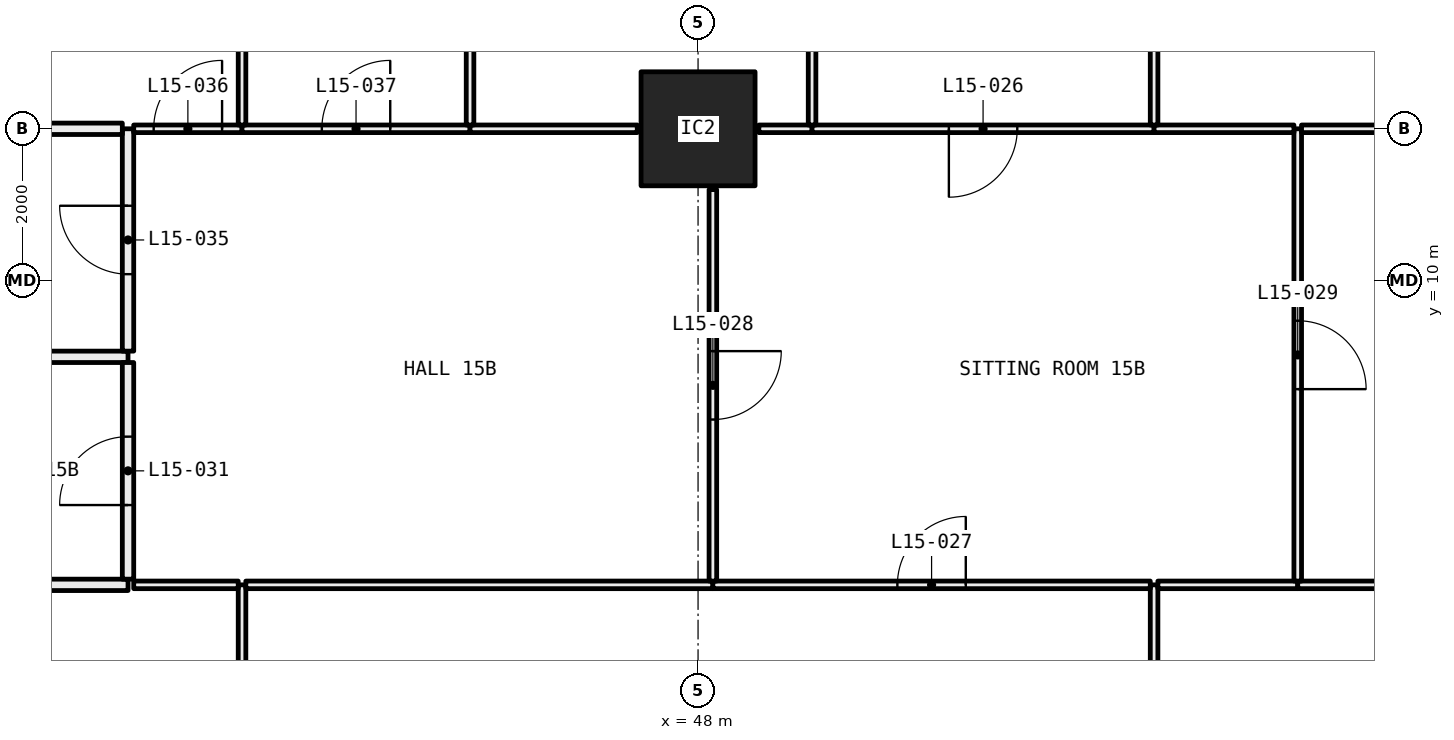
"""IFC4 building model, lengths in metres.
Left out: names, types, materials, properties, quantities, classifications, styles, units other than length and angle.
Written with IfcOpenShell. Run it as: python <this file> out.ifc"""

import sys

from ifc_helpers import new_model, si_unit, direction, frame, frame_2d, origin, origin_2d, place, context, subcontext, project, spatial, rectangle, hollow_rectangle, extrude, element, fill, save


model = new_model("IFC4")
c1 = context("Model", 3, precision=1e-05, world=origin(), true_north=direction((0.0, 1.0)))
c2 = subcontext(c1, "Body", "Model", "MODEL_VIEW")
j1 = project(units=[si_unit("LENGTHUNIT", "METRE"), si_unit("PLANEANGLEUNIT", "RADIAN")], contexts=[c1])
p1 = place(None, origin())
s1 = spatial("IfcSite", under=j1, at=p1, CompositionType="ELEMENT")
p2 = place(p1, origin())
s2 = spatial("IfcBuilding", under=s1, at=p2, CompositionType="ELEMENT")
p3 = place(p2, frame((0.0, 0.0, 64.5)))
s3 = spatial("IfcBuildingStorey", under=s2, at=p3, CompositionType="ELEMENT", Elevation=64.5)
p4 = place(p3, frame((48.0, 12.0, 0.0), z_axis=(0.0, 0.0, 1.0), x_axis=(1.0, 0.0, 0.0)))
e1 = element("IfcColumn", 1, at=p4, inside=s3, PredefinedType="COLUMN", context=c2, shape_type="SweptSolid", body=[
    extrude(hollow_rectangle(XDim=1.5, YDim=1.5, WallThickness=0.065, at=origin_2d()), origin(), (0.0, 0.0, 1.0), 3.05),
])
p5 = place(p3, frame((42.0, 0.72, 0.0), z_axis=(0.0, 0.0, 1.0), x_axis=(0.0, 1.0, 0.0)))
e2 = element("IfcWall", 2, at=p5, inside=s3, PredefinedType="PARTITIONING", context=c2, shape_type="SweptSolid", body=[
    extrude(rectangle(XDim=5.28, YDim=0.1, at=frame_2d((2.64, 0.0))), origin(), (0.0, 0.0, 1.0), 3.05),
])
p6 = place(p5, frame((2.19, 0.0, 0.0)))
e3 = element("IfcOpeningElement", 3, at=p6, cuts=e2, PredefinedType="OPENING", context=c2, shape_type="SweptSolid", body=[
    extrude(rectangle(XDim=0.9, YDim=2.1, at=frame_2d((0.45, 1.05))), frame((0.0, 0.06, 0.0), z_axis=(0.0, -1.0, 0.0), x_axis=(1.0, 0.0, 0.0)), (0.0, 0.0, 1.0), 0.12),
])
p7 = place(p3, frame((40.5, 6.0, 0.0), z_axis=(0.0, 0.0, 1.0), x_axis=(-1.0, 0.0, 0.0)))
e4 = element("IfcWall", 4, at=p7, inside=s3, PredefinedType="PARTITIONING", context=c2, shape_type="SweptSolid", body=[
    extrude(rectangle(XDim=4.4, YDim=0.15, at=frame_2d((2.2, 0.0))), origin(), (0.0, 0.0, 1.0), 3.05),
])
p8 = place(p3, frame((41.95, 6.0, 0.0), z_axis=(0.0, 0.0, 1.0), x_axis=(-1.0, 0.0, 0.0)))
e5 = element("IfcWall", 5, at=p8, inside=s3, PredefinedType="PARTITIONING", context=c2, shape_type="SweptSolid", body=[
    extrude(rectangle(XDim=1.375, YDim=0.1, at=frame_2d((0.688, 0.0))), origin(), (0.0, 0.0, 1.0), 3.05),
])
p9 = place(p3, frame((54.0, 0.72, 0.0), z_axis=(0.0, 0.0, 1.0), x_axis=(0.0, 1.0, 0.0)))
e6 = element("IfcWall", 6, at=p9, inside=s3, PredefinedType="PARTITIONING", context=c2, shape_type="SweptSolid", body=[
    extrude(rectangle(XDim=5.28, YDim=0.1, at=frame_2d((2.64, 0.0))), origin(), (0.0, 0.0, 1.0), 3.05),
])
p10 = place(p9, frame((2.19, 0.0, 0.0)))
e7 = element("IfcOpeningElement", 7, at=p10, cuts=e6, PredefinedType="OPENING", context=c2, shape_type="SweptSolid", body=[
    extrude(rectangle(XDim=0.9, YDim=2.1, at=frame_2d((0.45, 1.05))), frame((0.0, 0.06, 0.0), z_axis=(0.0, -1.0, 0.0), x_axis=(1.0, 0.0, 0.0)), (0.0, 0.0, 1.0), 0.12),
])
p11 = place(p3, frame((48.195, 6.0, 0.0), z_axis=(0.0, 0.0, 1.0), x_axis=(-1.0, 0.0, 0.0)))
e8 = element("IfcWall", 8, at=p11, inside=s3, PredefinedType="PARTITIONING", context=c2, shape_type="SweptSolid", body=[
    extrude(rectangle(XDim=6.145, YDim=0.1, at=frame_2d((3.073, 0.0))), origin(), (0.0, 0.0, 1.0), 2.45),
])
p12 = place(p3, frame((53.95, 6.0, 0.0), z_axis=(0.0, 0.0, 1.0), x_axis=(-1.0, 0.0, 0.0)))
e9 = element("IfcWall", 9, at=p12, inside=s3, PredefinedType="PARTITIONING", context=c2, shape_type="SweptSolid", body=[
    extrude(rectangle(XDim=5.755, YDim=0.1, at=frame_2d((2.877, 0.0))), origin(), (0.0, 0.0, 1.0), 3.05),
])
p13 = place(p12, frame((2.427, 0.0, 0.0)))
e10 = element("IfcOpeningElement", 10, at=p13, cuts=e9, PredefinedType="OPENING", context=c2, shape_type="SweptSolid", body=[
    extrude(rectangle(XDim=0.9, YDim=2.1, at=frame_2d((0.45, 1.05))), frame((0.0, 0.06, 0.0), z_axis=(0.0, -1.0, 0.0), x_axis=(1.0, 0.0, 0.0)), (0.0, 0.0, 1.0), 0.12),
])
p14 = place(p3, frame((55.89, 6.0, 0.0), z_axis=(0.0, 0.0, 1.0), x_axis=(-1.0, 0.0, 0.0)))
e11 = element("IfcWall", 11, at=p14, inside=s3, PredefinedType="PARTITIONING", context=c2, shape_type="SweptSolid", body=[
    extrude(rectangle(XDim=1.84, YDim=0.1, at=frame_2d((0.92, 0.0))), origin(), (0.0, 0.0, 1.0), 3.05),
])
p15 = place(p3, frame((59.95, 6.0, 0.0), z_axis=(0.0, 0.0, 1.0), x_axis=(-1.0, 0.0, 0.0)))
e12 = element("IfcWall", 12, at=p15, inside=s3, PredefinedType="PARTITIONING", context=c2, shape_type="SweptSolid", body=[
    extrude(rectangle(XDim=4.06, YDim=0.1, at=frame_2d((2.03, 0.0))), origin(), (0.0, 0.0, 1.0), 2.45),
])
p16 = place(p3, frame((40.5, 9.0, 0.0), z_axis=(0.0, 0.0, 1.0), x_axis=(-1.0, 0.0, 0.0)))
e13 = element("IfcWall", 13, at=p16, inside=s3, PredefinedType="PARTITIONING", context=c2, shape_type="SweptSolid", body=[
    extrude(rectangle(XDim=4.4, YDim=0.15, at=frame_2d((2.2, 0.0))), origin(), (0.0, 0.0, 1.0), 3.05),
])
p17 = place(p3, frame((40.5, 6.075, 0.0), z_axis=(0.0, 0.0, 1.0), x_axis=(0.0, 1.0, 0.0)))
e14 = element("IfcWall", 14, at=p17, inside=s3, PredefinedType="PARTITIONING", context=c2, shape_type="SweptSolid", body=[
    extrude(rectangle(XDim=2.85, YDim=0.15, at=frame_2d((1.425, 0.0))), origin(), (0.0, 0.0, 1.0), 3.05),
])
p18 = place(p17, frame((0.975, 0.0, 0.0)))
e15 = element("IfcOpeningElement", 15, at=p18, cuts=e14, PredefinedType="OPENING", context=c2, shape_type="SweptSolid", body=[
    extrude(rectangle(XDim=0.9, YDim=2.1, at=frame_2d((0.45, 1.05))), frame((0.0, 0.085, 0.0), z_axis=(0.0, -1.0, 0.0), x_axis=(1.0, 0.0, 0.0)), (0.0, 0.0, 1.0), 0.17),
])
p19 = place(p3, frame((40.5, 9.075, 0.0), z_axis=(0.0, 0.0, 1.0), x_axis=(0.0, 1.0, 0.0)))
e16 = element("IfcWall", 16, at=p19, inside=s3, PredefinedType="PARTITIONING", context=c2, shape_type="SweptSolid", body=[
    extrude(rectangle(XDim=2.925, YDim=0.15, at=frame_2d((1.462, 0.0))), origin(), (0.0, 0.0, 1.0), 2.45),
])
p20 = place(p19, frame((1.012, 0.0, 0.0)))
e17 = element("IfcOpeningElement", 17, at=p20, cuts=e16, PredefinedType="OPENING", context=c2, shape_type="SweptSolid", body=[
    extrude(rectangle(XDim=0.9, YDim=2.1, at=frame_2d((0.45, 1.05))), frame((0.0, 0.085, 0.0), z_axis=(0.0, -1.0, 0.0), x_axis=(1.0, 0.0, 0.0)), (0.0, 0.0, 1.0), 0.17),
])
p21 = place(p3, frame((40.425, 12.0, 0.0), z_axis=(0.0, 0.0, 1.0), x_axis=(-1.0, 0.0, 0.0)))
e18 = element("IfcWall", 18, at=p21, inside=s3, PredefinedType="PARTITIONING", context=c2, shape_type="SweptSolid", body=[
    extrude(rectangle(XDim=3.625, YDim=0.15, at=frame_2d((1.812, 0.0))), origin(), (0.0, 0.0, 1.0), 2.45),
])
p22 = place(p3, frame((48.195, 6.05, 0.0), z_axis=(0.0, 0.0, 1.0), x_axis=(0.0, 1.0, 0.0)))
e19 = element("IfcWall", 19, at=p22, inside=s3, PredefinedType="PARTITIONING", context=c2, shape_type="SweptSolid", body=[
    extrude(rectangle(XDim=5.15, YDim=0.1, at=frame_2d((2.575, 0.0))), origin(), (0.0, 0.0, 1.0), 3.05),
])
p23 = place(p22, frame((2.125, 0.0, 0.0)))
e20 = element("IfcOpeningElement", 20, at=p23, cuts=e19, PredefinedType="OPENING", context=c2, shape_type="SweptSolid", body=[
    extrude(rectangle(XDim=0.9, YDim=2.1, at=frame_2d((0.45, 1.05))), frame((0.0, 0.06, 0.0), z_axis=(0.0, -1.0, 0.0), x_axis=(1.0, 0.0, 0.0)), (0.0, 0.0, 1.0), 0.12),
])
p24 = place(p3, frame((42.0, 12.0, 0.0), z_axis=(0.0, 0.0, 1.0), x_axis=(-1.0, 0.0, 0.0)))
e21 = element("IfcWall", 21, at=p24, inside=s3, PredefinedType="PARTITIONING", context=c2, shape_type="SweptSolid", body=[
    extrude(rectangle(XDim=1.425, YDim=0.1, at=frame_2d((0.712, 0.0))), origin(), (0.0, 0.0, 1.0), 2.45),
])
p25 = place(p24, frame((0.262, 0.0, 0.0)))
e22 = element("IfcOpeningElement", 22, at=p25, cuts=e21, PredefinedType="OPENING", context=c2, shape_type="SweptSolid", body=[
    extrude(rectangle(XDim=0.9, YDim=2.1, at=frame_2d((0.45, 1.05))), frame((0.0, 0.06, 0.0), z_axis=(0.0, -1.0, 0.0), x_axis=(1.0, 0.0, 0.0)), (0.0, 0.0, 1.0), 0.12),
])
p26 = place(p3, frame((45.0, 12.0, 0.0), z_axis=(0.0, 0.0, 1.0), x_axis=(-1.0, 0.0, 0.0)))
e23 = element("IfcWall", 23, at=p26, inside=s3, PredefinedType="PARTITIONING", context=c2, shape_type="SweptSolid", body=[
    extrude(rectangle(XDim=3.0, YDim=0.1, at=frame_2d((1.5, 0.0))), origin(), (0.0, 0.0, 1.0), 2.45),
])
p27 = place(p26, frame((1.05, 0.0, 0.0)))
e24 = element("IfcOpeningElement", 24, at=p27, cuts=e23, PredefinedType="OPENING", context=c2, shape_type="SweptSolid", body=[
    extrude(rectangle(XDim=0.9, YDim=2.1, at=frame_2d((0.45, 1.05))), frame((0.0, 0.06, 0.0), z_axis=(0.0, -1.0, 0.0), x_axis=(1.0, 0.0, 0.0)), (0.0, 0.0, 1.0), 0.12),
])
p28 = place(p3, frame((47.2, 12.0, 0.0), z_axis=(0.0, 0.0, 1.0), x_axis=(-1.0, 0.0, 0.0)))
e25 = element("IfcWall", 25, at=p28, inside=s3, PredefinedType="PARTITIONING", context=c2, shape_type="SweptSolid", body=[
    extrude(rectangle(XDim=2.2, YDim=0.1, at=frame_2d((1.1, 0.0))), origin(), (0.0, 0.0, 1.0), 2.45),
])
p29 = place(p3, frame((55.89, 6.05, 0.0), z_axis=(0.0, 0.0, 1.0), x_axis=(0.0, 1.0, 0.0)))
e26 = element("IfcWall", 26, at=p29, inside=s3, PredefinedType="PARTITIONING", context=c2, shape_type="SweptSolid", body=[
    extrude(rectangle(XDim=5.95, YDim=0.1, at=frame_2d((2.975, 0.0))), origin(), (0.0, 0.0, 1.0), 2.45),
])
p30 = place(p29, frame((2.525, 0.0, 0.0)))
e27 = element("IfcOpeningElement", 27, at=p30, cuts=e26, PredefinedType="OPENING", context=c2, shape_type="SweptSolid", body=[
    extrude(rectangle(XDim=0.9, YDim=2.1, at=frame_2d((0.45, 1.05))), frame((0.0, 0.06, 0.0), z_axis=(0.0, -1.0, 0.0), x_axis=(1.0, 0.0, 0.0)), (0.0, 0.0, 1.0), 0.12),
])
p31 = place(p3, frame((49.5, 12.0, 0.0), z_axis=(0.0, 0.0, 1.0), x_axis=(-1.0, 0.0, 0.0)))
e28 = element("IfcWall", 28, at=p31, inside=s3, PredefinedType="PARTITIONING", context=c2, shape_type="SweptSolid", body=[
    extrude(rectangle(XDim=0.7, YDim=0.1, at=frame_2d((0.35, 0.0))), origin(), (0.0, 0.0, 1.0), 2.45),
])
p32 = place(p3, frame((54.0, 12.0, 0.0), z_axis=(0.0, 0.0, 1.0), x_axis=(-1.0, 0.0, 0.0)))
e29 = element("IfcWall", 29, at=p32, inside=s3, PredefinedType="PARTITIONING", context=c2, shape_type="SweptSolid", body=[
    extrude(rectangle(XDim=4.5, YDim=0.1, at=frame_2d((2.25, 0.0))), origin(), (0.0, 0.0, 1.0), 2.45),
])
p33 = place(p32, frame((1.8, 0.0, 0.0)))
e30 = element("IfcOpeningElement", 30, at=p33, cuts=e29, PredefinedType="OPENING", context=c2, shape_type="SweptSolid", body=[
    extrude(rectangle(XDim=0.9, YDim=2.1, at=frame_2d((0.45, 1.05))), frame((0.0, 0.06, 0.0), z_axis=(0.0, -1.0, 0.0), x_axis=(1.0, 0.0, 0.0)), (0.0, 0.0, 1.0), 0.12),
])
p34 = place(p3, frame((55.84, 12.0, 0.0), z_axis=(0.0, 0.0, 1.0), x_axis=(-1.0, 0.0, 0.0)))
e31 = element("IfcWall", 31, at=p34, inside=s3, PredefinedType="PARTITIONING", context=c2, shape_type="SweptSolid", body=[
    extrude(rectangle(XDim=1.84, YDim=0.1, at=frame_2d((0.92, 0.0))), origin(), (0.0, 0.0, 1.0), 2.45),
])
p35 = place(p3, frame((59.2, 12.0, 0.0), z_axis=(0.0, 0.0, 1.0), x_axis=(-1.0, 0.0, 0.0)))
e32 = element("IfcWall", 32, at=p35, inside=s3, PredefinedType="PARTITIONING", context=c2, shape_type="SweptSolid", body=[
    extrude(rectangle(XDim=3.26, YDim=0.1, at=frame_2d((1.63, 0.0))), origin(), (0.0, 0.0, 1.0), 2.45),
])
for number, where, z_axis, x_axis in (
    (33, (42.0, 12.05, 0.0), (0.0, 0.0, 1.0), (0.0, 1.0, 0.0)),
    (34, (45.0, 12.05, 0.0), (0.0, 0.0, 1.0), (0.0, 1.0, 0.0)),
):
    element("IfcWall", number, at=place(p3, frame(where, z_axis=z_axis, x_axis=x_axis)), inside=s3, PredefinedType="PARTITIONING", context=c2, shape_type="SweptSolid", body=[
        extrude(rectangle(XDim=5.95, YDim=0.1, at=frame_2d((2.975, 0.0))), origin(), (0.0, 0.0, 1.0), 2.45),
    ])
p36 = place(p3, frame((49.5, 12.05, 0.0), z_axis=(0.0, 0.0, 1.0), x_axis=(0.0, 1.0, 0.0)))
e35 = element("IfcWall", 35, at=p36, inside=s3, PredefinedType="PARTITIONING", context=c2, shape_type="SweptSolid", body=[
    extrude(rectangle(XDim=5.85, YDim=0.1, at=frame_2d((2.925, 0.0))), origin(), (0.0, 0.0, 1.0), 2.45),
])
p37 = place(p36, frame((2.475, 0.0, 0.0)))
e36 = element("IfcOpeningElement", 36, at=p37, cuts=e35, PredefinedType="OPENING", context=c2, shape_type="SweptSolid", body=[
    extrude(rectangle(XDim=0.9, YDim=2.1, at=frame_2d((0.45, 1.05))), frame((0.0, 0.06, 0.0), z_axis=(0.0, -1.0, 0.0), x_axis=(1.0, 0.0, 0.0)), (0.0, 0.0, 1.0), 0.12),
])
p38 = place(p3, frame((54.0, 12.05, 0.0), z_axis=(0.0, 0.0, 1.0), x_axis=(0.0, 1.0, 0.0)))
e37 = element("IfcWall", 37, at=p38, inside=s3, PredefinedType="PARTITIONING", context=c2, shape_type="SweptSolid", body=[
    extrude(rectangle(XDim=5.85, YDim=0.1, at=frame_2d((2.925, 0.0))), origin(), (0.0, 0.0, 1.0), 2.45),
])
p39 = place(p38, frame((2.475, 0.0, 0.0)))
e38 = element("IfcOpeningElement", 38, at=p39, cuts=e37, PredefinedType="OPENING", context=c2, shape_type="SweptSolid", body=[
    extrude(rectangle(XDim=0.9, YDim=2.1, at=frame_2d((0.45, 1.05))), frame((0.0, 0.06, 0.0), z_axis=(0.0, -1.0, 0.0), x_axis=(1.0, 0.0, 0.0)), (0.0, 0.0, 1.0), 0.12),
])
p40 = place(p33, origin())
e39 = element("IfcDoor", 39, at=p40, inside=s3, OperationType="SINGLE_SWING_LEFT", PredefinedType="DOOR", context=c2, shape_type="SweptSolid", body=[
    extrude(rectangle(XDim=0.9, YDim=2.1, at=frame_2d((0.45, 1.05))), frame((0.0, 0.025, 0.0), z_axis=(0.0, -1.0, 0.0), x_axis=(1.0, 0.0, 0.0)), (0.0, 0.0, 1.0), 0.05),
])
fill(e30, e39)
p41 = place(p13, frame((0.9, 0.0, 0.0), x_axis=(-1.0, 0.0, 0.0)))
e40 = element("IfcDoor", 40, at=p41, inside=s3, OperationType="SINGLE_SWING_LEFT", PredefinedType="DOOR", context=c2, shape_type="SweptSolid", body=[
    extrude(rectangle(XDim=0.9, YDim=2.1, at=frame_2d((0.45, 1.05))), frame((0.0, 0.025, 0.0), z_axis=(0.0, -1.0, 0.0), x_axis=(1.0, 0.0, 0.0)), (0.0, 0.0, 1.0), 0.05),
])
fill(e10, e40)
p42 = place(p23, frame((0.9, 0.0, 0.0), x_axis=(-1.0, 0.0, 0.0)))
e41 = element("IfcDoor", 41, at=p42, inside=s3, OperationType="SINGLE_SWING_RIGHT", PredefinedType="DOOR", context=c2, shape_type="SweptSolid", body=[
    extrude(rectangle(XDim=0.9, YDim=2.1, at=frame_2d((0.45, 1.05))), frame((0.0, 0.025, 0.0), z_axis=(0.0, -1.0, 0.0), x_axis=(1.0, 0.0, 0.0)), (0.0, 0.0, 1.0), 0.05),
])
fill(e20, e41)
p43 = place(p30, frame((0.9, 0.0, 0.0), x_axis=(-1.0, 0.0, 0.0)))
e42 = element("IfcDoor", 42, at=p43, inside=s3, OperationType="SINGLE_SWING_LEFT", PredefinedType="DOOR", context=c2, shape_type="SweptSolid", body=[
    extrude(rectangle(XDim=0.9, YDim=2.1, at=frame_2d((0.45, 1.05))), frame((0.0, 0.025, 0.0), z_axis=(0.0, -1.0, 0.0), x_axis=(1.0, 0.0, 0.0)), (0.0, 0.0, 1.0), 0.05),
])
fill(e27, e42)
p44 = place(p18, origin())
e43 = element("IfcDoor", 43, at=p44, inside=s3, OperationType="SINGLE_SWING_RIGHT", PredefinedType="DOOR", context=c2, shape_type="SweptSolid", body=[
    extrude(rectangle(XDim=0.9, YDim=2.1, at=frame_2d((0.45, 1.05))), frame((0.0, 0.025, 0.0), z_axis=(0.0, -1.0, 0.0), x_axis=(1.0, 0.0, 0.0)), (0.0, 0.0, 1.0), 0.05),
])
fill(e15, e43)
p45 = place(p20, origin())
e44 = element("IfcDoor", 44, at=p45, inside=s3, OperationType="SINGLE_SWING_LEFT", PredefinedType="DOOR", context=c2, shape_type="SweptSolid", body=[
    extrude(rectangle(XDim=0.9, YDim=2.1, at=frame_2d((0.45, 1.05))), frame((0.0, 0.025, 0.0), z_axis=(0.0, -1.0, 0.0), x_axis=(1.0, 0.0, 0.0)), (0.0, 0.0, 1.0), 0.05),
])
fill(e17, e44)
p46 = place(p25, frame((0.9, 0.0, 0.0), x_axis=(-1.0, 0.0, 0.0)))
e45 = element("IfcDoor", 45, at=p46, inside=s3, OperationType="SINGLE_SWING_LEFT", PredefinedType="DOOR", context=c2, shape_type="SweptSolid", body=[
    extrude(rectangle(XDim=0.9, YDim=2.1, at=frame_2d((0.45, 1.05))), frame((0.0, 0.025, 0.0), z_axis=(0.0, -1.0, 0.0), x_axis=(1.0, 0.0, 0.0)), (0.0, 0.0, 1.0), 0.05),
])
fill(e22, e45)
p47 = place(p27, frame((0.9, 0.0, 0.0), x_axis=(-1.0, 0.0, 0.0)))
e46 = element("IfcDoor", 46, at=p47, inside=s3, OperationType="SINGLE_SWING_LEFT", PredefinedType="DOOR", context=c2, shape_type="SweptSolid", body=[
    extrude(rectangle(XDim=0.9, YDim=2.1, at=frame_2d((0.45, 1.05))), frame((0.0, 0.025, 0.0), z_axis=(0.0, -1.0, 0.0), x_axis=(1.0, 0.0, 0.0)), (0.0, 0.0, 1.0), 0.05),
])
fill(e24, e46)
save(model, sys.argv[1])
